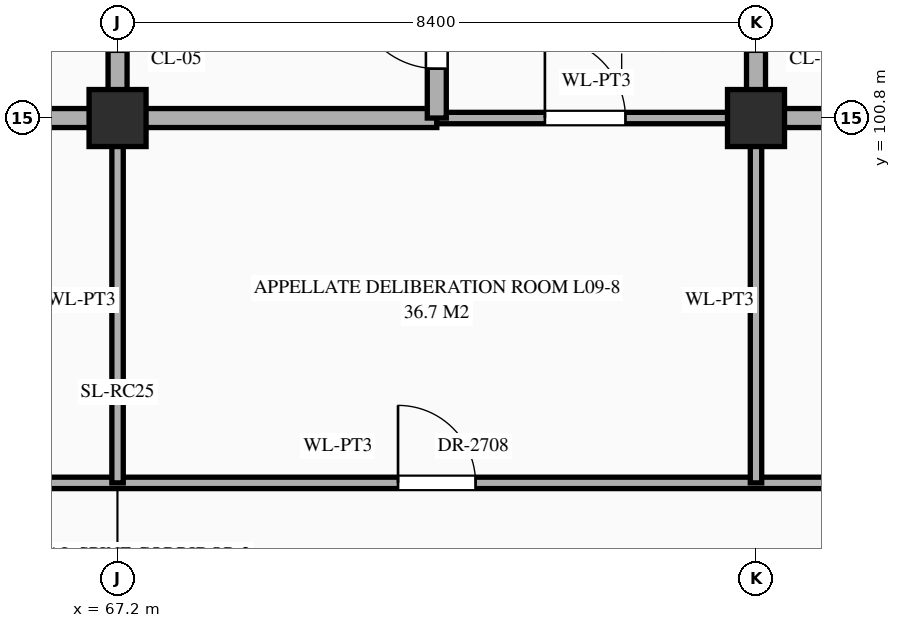
"""IFC4 building model, lengths in metres.
Left out: names, types, materials, properties, quantities, classifications, styles, units other than length and angle.
Written with IfcOpenShell. Run it as: python <this file> out.ifc"""

import sys

from ifc_helpers import new_model, si_unit, direction, frame, frame_2d, origin, origin_2d, place, context, subcontext, project, spatial, rectangle, extrude, element, fill, save


model = new_model("IFC4")
c1 = context("Model", 3, precision=1e-05, world=origin(), true_north=direction((0.0, 1.0)))
c2 = subcontext(c1, "Body", "Model", "MODEL_VIEW")
j1 = project(units=[si_unit("LENGTHUNIT", "METRE"), si_unit("PLANEANGLEUNIT", "RADIAN")], contexts=[c1])
p1 = place(None, origin())
s1 = spatial("IfcSite", under=j1, at=p1, CompositionType="ELEMENT")
p2 = place(p1, origin())
s2 = spatial("IfcBuilding", under=s1, at=p2, CompositionType="ELEMENT")
p3 = place(p2, frame((0.0, 0.0, 39.3)))
s3 = spatial("IfcBuildingStorey", under=s2, at=p3, CompositionType="ELEMENT", Elevation=39.3)
for number, where, z_axis, x_axis in (
    (1, (67.2, 100.8, 0.0), (0.0, 0.0, 1.0), (1.0, 0.0, 0.0)),
    (2, (75.6, 100.8, 0.0), (0.0, 0.0, 1.0), (1.0, 0.0, 0.0)),
):
    element("IfcColumn", number, at=place(p3, frame(where, z_axis=z_axis, x_axis=x_axis)), inside=s3, PredefinedType="COLUMN", context=c2, shape_type="SweptSolid", body=[
        extrude(rectangle(XDim=0.75, YDim=0.75, at=origin_2d()), origin(), (0.0, 0.0, 1.0), 4.2),
    ])
p4 = place(p3, frame((56.2, 96.0, 0.0), z_axis=(0.0, 0.0, 1.0), x_axis=(1.0, 0.0, 0.0)))
e3 = element("IfcWall", 3, at=p4, inside=s3, PredefinedType="STANDARD", context=c2, shape_type="SweptSolid", body=[
    extrude(rectangle(XDim=27.8, YDim=0.15, at=frame_2d((13.9, 0.0))), origin(), (0.0, 0.0, 1.0), 3.95),
])
p5 = place(p4, frame((0.83, 0.0, 0.0)))
e4 = element("IfcOpeningElement", 4, at=p5, cuts=e3, PredefinedType="OPENING", context=c2, shape_type="SweptSolid", body=[
    extrude(rectangle(XDim=0.94, YDim=2.3, at=frame_2d((0.47, 1.15))), frame((0.0, 0.087, 0.0), z_axis=(0.0, -1.0, 0.0), x_axis=(1.0, 0.0, 0.0)), (0.0, 0.0, 1.0), 0.174),
])
p6 = place(p4, frame((6.31, 0.0, 0.0)))
e5 = element("IfcOpeningElement", 5, at=p6, cuts=e3, PredefinedType="OPENING", context=c2, shape_type="SweptSolid", body=[
    extrude(rectangle(XDim=0.98, YDim=2.35, at=frame_2d((0.49, 1.175))), frame((0.0, 0.087, 0.0), z_axis=(0.0, -1.0, 0.0), x_axis=(1.0, 0.0, 0.0)), (0.0, 0.0, 1.0), 0.174),
])
p7 = place(p4, frame((14.69, 0.0, 0.0)))
e6 = element("IfcOpeningElement", 6, at=p7, cuts=e3, PredefinedType="OPENING", context=c2, shape_type="SweptSolid", body=[
    extrude(rectangle(XDim=1.02, YDim=2.4, at=frame_2d((0.51, 1.2))), frame((0.0, 0.087, 0.0), z_axis=(0.0, -1.0, 0.0), x_axis=(1.0, 0.0, 0.0)), (0.0, 0.0, 1.0), 0.174),
])
p8 = place(p4, frame((23.07, 0.0, 0.0)))
e7 = element("IfcOpeningElement", 7, at=p8, cuts=e3, PredefinedType="OPENING", context=c2, shape_type="SweptSolid", body=[
    extrude(rectangle(XDim=1.06, YDim=2.4, at=frame_2d((0.53, 1.2))), frame((0.0, 0.087, 0.0), z_axis=(0.0, -1.0, 0.0), x_axis=(1.0, 0.0, 0.0)), (0.0, 0.0, 1.0), 0.174),
])
p9 = place(p3, frame((58.8, 100.8, 0.0), z_axis=(0.0, 0.0, 1.0), x_axis=(1.0, 0.0, 0.0)))
e8 = element("IfcWall", 8, at=p9, inside=s3, PredefinedType="STANDARD", context=c2, shape_type="SweptSolid", body=[
    extrude(rectangle(XDim=12.6, YDim=0.25, at=frame_2d((6.3, 0.0))), origin(), (0.0, 0.0, 1.0), 3.1),
])
p10 = place(p9, frame((3.7, 0.0, 0.0)))
e9 = element("IfcOpeningElement", 9, at=p10, cuts=e8, PredefinedType="OPENING", context=c2, shape_type="SweptSolid", body=[
    extrude(rectangle(XDim=1.0, YDim=2.2, at=frame_2d((0.5, 1.1))), frame((0.0, 0.137, 0.0), z_axis=(0.0, -1.0, 0.0), x_axis=(1.0, 0.0, 0.0)), (0.0, 0.0, 1.0), 0.274),
])
p11 = place(p3, frame((71.4, 100.8, 0.0), z_axis=(0.0, 0.0, 1.0), x_axis=(1.0, 0.0, 0.0)))
e10 = element("IfcWall", 10, at=p11, inside=s3, PredefinedType="STANDARD", context=c2, shape_type="SweptSolid", body=[
    extrude(rectangle(XDim=4.2, YDim=0.15, at=frame_2d((2.1, 0.0))), origin(), (0.0, 0.0, 1.0), 3.1),
])
p12 = place(p11, frame((1.423, 0.0, 0.0)))
e11 = element("IfcOpeningElement", 11, at=p12, cuts=e10, PredefinedType="OPENING", context=c2, shape_type="SweptSolid", body=[
    extrude(rectangle(XDim=1.06, YDim=2.4, at=frame_2d((0.53, 1.2))), frame((0.0, 0.087, 0.0), z_axis=(0.0, -1.0, 0.0), x_axis=(1.0, 0.0, 0.0)), (0.0, 0.0, 1.0), 0.174),
])
p13 = place(p3, frame((75.6, 100.8, 0.0), z_axis=(0.0, 0.0, 1.0), x_axis=(1.0, 0.0, 0.0)))
e12 = element("IfcWall", 12, at=p13, inside=s3, PredefinedType="STANDARD", context=c2, shape_type="SweptSolid", body=[
    extrude(rectangle(XDim=16.8, YDim=0.25, at=frame_2d((8.4, 0.0))), origin(), (0.0, 0.0, 1.0), 3.1),
])
p14 = place(p13, frame((3.7, 0.0, 0.0)))
e13 = element("IfcOpeningElement", 13, at=p14, cuts=e12, PredefinedType="OPENING", context=c2, shape_type="SweptSolid", body=[
    extrude(rectangle(XDim=1.0, YDim=2.2, at=frame_2d((0.5, 1.1))), frame((0.0, 0.137, 0.0), z_axis=(0.0, -1.0, 0.0), x_axis=(1.0, 0.0, 0.0)), (0.0, 0.0, 1.0), 0.274),
])
p15 = place(p13, frame((9.698, 0.0, 0.0)))
e14 = element("IfcOpeningElement", 14, at=p15, cuts=e12, PredefinedType="OPENING", context=c2, shape_type="SweptSolid", body=[
    extrude(rectangle(XDim=1.1, YDim=2.2, at=frame_2d((0.55, 1.1))), frame((0.0, 0.137, 0.0), z_axis=(0.0, -1.0, 0.0), x_axis=(1.0, 0.0, 0.0)), (0.0, 0.0, 1.0), 0.274),
])
p16 = place(p13, frame((12.5, 0.0, 0.0)))
e15 = element("IfcOpeningElement", 15, at=p16, cuts=e12, PredefinedType="OPENING", context=c2, shape_type="SweptSolid", body=[
    extrude(rectangle(XDim=1.0, YDim=2.2, at=frame_2d((0.5, 1.1))), frame((0.0, 0.137, 0.0), z_axis=(0.0, -1.0, 0.0), x_axis=(1.0, 0.0, 0.0)), (0.0, 0.0, 1.0), 0.274),
])
p17 = place(p13, frame((14.877, 0.0, 0.0)))
e16 = element("IfcOpeningElement", 16, at=p17, cuts=e12, PredefinedType="OPENING", context=c2, shape_type="SweptSolid", body=[
    extrude(rectangle(XDim=0.95, YDim=2.15, at=frame_2d((0.475, 1.075))), frame((0.0, 0.137, 0.0), z_axis=(0.0, -1.0, 0.0), x_axis=(1.0, 0.0, 0.0)), (0.0, 0.0, 1.0), 0.274),
])
p18 = place(p3, frame((67.2, 96.0, 0.0), z_axis=(0.0, 0.0, 1.0), x_axis=(0.0, 1.0, 0.0)))
e17 = element("IfcWall", 17, at=p18, inside=s3, PredefinedType="STANDARD", context=c2, shape_type="SweptSolid", body=[
    extrude(rectangle(XDim=4.8, YDim=0.15, at=frame_2d((2.4, 0.0))), origin(), (0.0, 0.0, 1.0), 3.2),
])
p19 = place(p3, frame((67.2, 100.8, 0.0), z_axis=(0.0, 0.0, 1.0), x_axis=(0.0, 1.0, 0.0)))
e18 = element("IfcWall", 18, at=p19, inside=s3, PredefinedType="STANDARD", context=c2, shape_type="SweptSolid", body=[
    extrude(rectangle(XDim=2.4, YDim=0.25, at=frame_2d((1.2, 0.0))), origin(), (0.0, 0.0, 1.0), 3.2),
])
p20 = place(p19, frame((0.873, 0.0, 0.0)))
e19 = element("IfcOpeningElement", 19, at=p20, cuts=e18, PredefinedType="OPENING", context=c2, shape_type="SweptSolid", body=[
    extrude(rectangle(XDim=0.95, YDim=2.15, at=frame_2d((0.475, 1.075))), frame((0.0, 0.137, 0.0), z_axis=(0.0, -1.0, 0.0), x_axis=(1.0, 0.0, 0.0)), (0.0, 0.0, 1.0), 0.274),
])
p21 = place(p3, frame((71.4, 100.8, 0.0), z_axis=(0.0, 0.0, 1.0), x_axis=(0.0, 1.0, 0.0)))
e20 = element("IfcWall", 20, at=p21, inside=s3, PredefinedType="STANDARD", context=c2, shape_type="SweptSolid", body=[
    extrude(rectangle(XDim=3.6, YDim=0.25, at=frame_2d((1.8, 0.0))), origin(), (0.0, 0.0, 1.0), 3.6),
])
p22 = place(p21, frame((0.65, 0.0, 0.0)))
e21 = element("IfcOpeningElement", 21, at=p22, cuts=e20, PredefinedType="OPENING", context=c2, shape_type="SweptSolid", body=[
    extrude(rectangle(XDim=1.1, YDim=2.2, at=frame_2d((0.55, 1.1))), frame((0.0, 0.137, 0.0), z_axis=(0.0, -1.0, 0.0), x_axis=(1.0, 0.0, 0.0)), (0.0, 0.0, 1.0), 0.274),
])
p23 = place(p3, frame((75.6, 96.0, 0.0), z_axis=(0.0, 0.0, 1.0), x_axis=(0.0, 1.0, 0.0)))
e22 = element("IfcWall", 22, at=p23, inside=s3, PredefinedType="STANDARD", context=c2, shape_type="SweptSolid", body=[
    extrude(rectangle(XDim=4.8, YDim=0.15, at=frame_2d((2.4, 0.0))), origin(), (0.0, 0.0, 1.0), 3.2),
])
p24 = place(p3, frame((75.6, 100.8, 0.0), z_axis=(0.0, 0.0, 1.0), x_axis=(0.0, 1.0, 0.0)))
e23 = element("IfcWall", 23, at=p24, inside=s3, PredefinedType="STANDARD", context=c2, shape_type="SweptSolid", body=[
    extrude(rectangle(XDim=3.6, YDim=0.25, at=frame_2d((1.8, 0.0))), origin(), (0.0, 0.0, 1.0), 3.2),
])
p25 = place(p24, frame((0.873, 0.0, 0.0)))
e24 = element("IfcOpeningElement", 24, at=p25, cuts=e23, PredefinedType="OPENING", context=c2, shape_type="SweptSolid", body=[
    extrude(rectangle(XDim=0.95, YDim=2.15, at=frame_2d((0.475, 1.075))), frame((0.0, 0.137, 0.0), z_axis=(0.0, -1.0, 0.0), x_axis=(1.0, 0.0, 0.0)), (0.0, 0.0, 1.0), 0.274),
])
p26 = place(p22, origin())
e25 = element("IfcDoor", 25, at=p26, inside=s3, OperationType="SINGLE_SWING_RIGHT", PredefinedType="DOOR", context=c2, shape_type="SweptSolid", body=[
    extrude(rectangle(XDim=1.1, YDim=2.2, at=frame_2d((0.55, 1.1))), frame((0.0, 0.025, 0.0), z_axis=(0.0, -1.0, 0.0), x_axis=(1.0, 0.0, 0.0)), (0.0, 0.0, 1.0), 0.05),
])
fill(e21, e25)
p27 = place(p12, origin())
e26 = element("IfcDoor", 26, at=p27, inside=s3, OperationType="SINGLE_SWING_LEFT", PredefinedType="DOOR", context=c2, shape_type="SweptSolid", body=[
    extrude(rectangle(XDim=1.06, YDim=2.4, at=frame_2d((0.53, 1.2))), frame((0.0, 0.025, 0.0), z_axis=(0.0, -1.0, 0.0), x_axis=(1.0, 0.0, 0.0)), (0.0, 0.0, 1.0), 0.05),
])
fill(e11, e26)
p28 = place(p7, origin())
e27 = element("IfcDoor", 27, at=p28, inside=s3, OperationType="SINGLE_SWING_LEFT", PredefinedType="DOOR", context=c2, shape_type="SweptSolid", body=[
    extrude(rectangle(XDim=1.02, YDim=2.4, at=frame_2d((0.51, 1.2))), frame((0.0, 0.025, 0.0), z_axis=(0.0, -1.0, 0.0), x_axis=(1.0, 0.0, 0.0)), (0.0, 0.0, 1.0), 0.05),
])
fill(e6, e27)
save(model, sys.argv[1])
